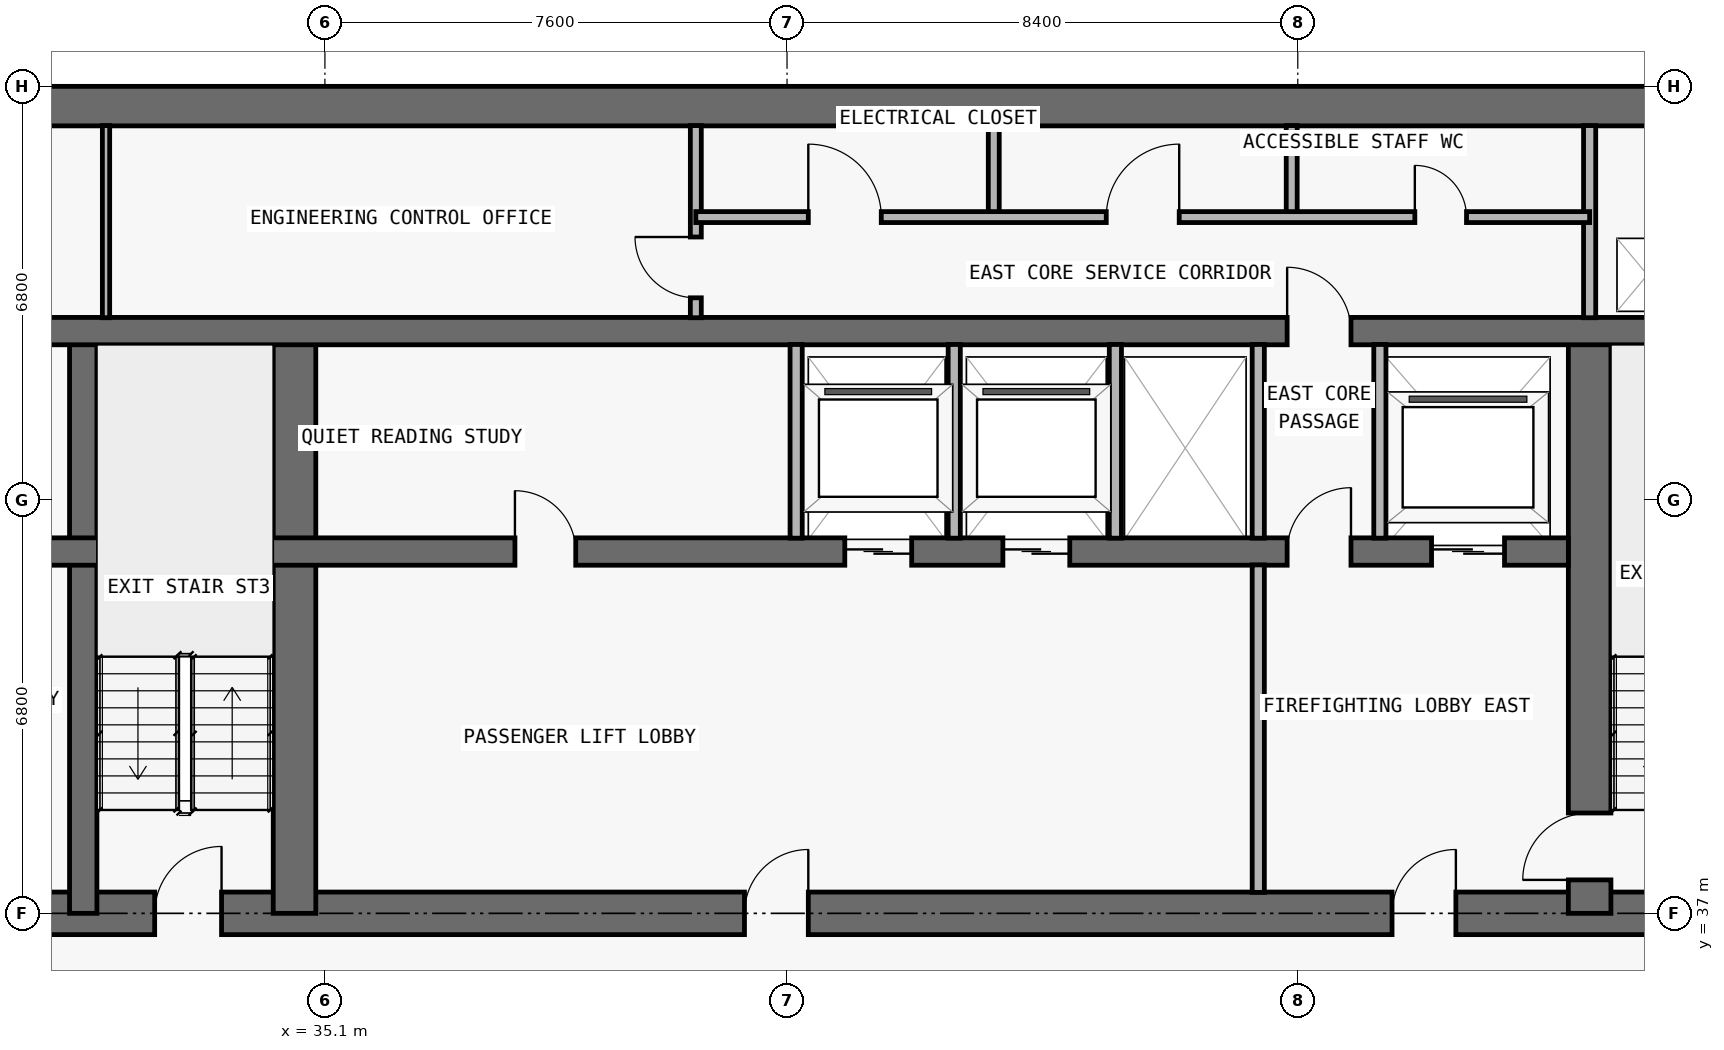
"""IFC4 building model, lengths in metres.
Left out: names, types, materials, properties, quantities, classifications, styles, units other than length and angle.
Written with IfcOpenShell. Run it as: python <this file> out.ifc"""

import sys

from ifc_helpers import new_model, si_unit, direction, frame, frame_2d, origin, place, context, subcontext, project, spatial, rectangle, extrude, element, fill, save


model = new_model("IFC4")
c1 = context("Model", 3, precision=1e-05, world=origin(), true_north=direction((0.0, 1.0)))
c2 = subcontext(c1, "Body", "Model", "MODEL_VIEW")
j1 = project(units=[si_unit("LENGTHUNIT", "METRE"), si_unit("PLANEANGLEUNIT", "RADIAN")], contexts=[c1])
p1 = place(None, origin())
s1 = spatial("IfcSite", under=j1, at=p1, CompositionType="ELEMENT")
p2 = place(p1, origin())
s2 = spatial("IfcBuilding", under=s1, at=p2, CompositionType="ELEMENT")
p3 = place(p2, frame((0.0, 0.0, 180.3)))
s3 = spatial("IfcBuildingStorey", under=s2, at=p3, CompositionType="ELEMENT", Elevation=180.3)
p4 = place(p3, frame((17.95, 37.0, 0.0), z_axis=(0.0, 0.0, 1.0), x_axis=(1.0, 0.0, 0.0)))
e1 = element("IfcWall", 1, at=p4, inside=s3, PredefinedType="SHEAR", context=c2, shape_type="SweptSolid", body=[
    extrude(rectangle(XDim=41.9, YDim=0.7, at=frame_2d((20.95, 0.0))), origin(), (0.0, 0.0, 1.0), 3.0),
])
p5 = place(p4, frame((14.35, 0.0, 0.0)))
e2 = element("IfcOpeningElement", 2, at=p5, cuts=e1, PredefinedType="OPENING", context=c2, shape_type="SweptSolid", body=[
    extrude(rectangle(XDim=1.1, YDim=2.15, at=frame_2d((0.55, 1.075))), frame((0.0, 0.36, 0.0), z_axis=(0.0, -1.0, 0.0), x_axis=(1.0, 0.0, 0.0)), (0.0, 0.0, 1.0), 0.72),
])
p6 = place(p4, frame((6.2, 0.0, 0.0)))
e3 = element("IfcOpeningElement", 3, at=p6, cuts=e1, PredefinedType="OPENING", context=c2, shape_type="SweptSolid", body=[
    extrude(rectangle(XDim=1.05, YDim=2.15, at=frame_2d((0.525, 1.075))), frame((0.0, 0.36, 0.0), z_axis=(0.0, -1.0, 0.0), x_axis=(1.0, 0.0, 0.0)), (0.0, 0.0, 1.0), 0.72),
])
p7 = place(p4, frame((34.7, 0.0, 0.0)))
e4 = element("IfcOpeningElement", 4, at=p7, cuts=e1, PredefinedType="OPENING", context=c2, shape_type="SweptSolid", body=[
    extrude(rectangle(XDim=1.05, YDim=2.15, at=frame_2d((0.525, 1.075))), frame((0.0, 0.36, 0.0), z_axis=(0.0, -1.0, 0.0), x_axis=(1.0, 0.0, 0.0)), (0.0, 0.0, 1.0), 0.72),
])
p8 = place(p4, frame((10.812, 0.0, 0.0)))
e5 = element("IfcOpeningElement", 5, at=p8, cuts=e1, PredefinedType="OPENING", context=c2, shape_type="SweptSolid", body=[
    extrude(rectangle(XDim=1.05, YDim=2.15, at=frame_2d((0.525, 1.075))), frame((0.0, 0.36, 0.0), z_axis=(0.0, -1.0, 0.0), x_axis=(1.0, 0.0, 0.0)), (0.0, 0.0, 1.0), 0.72),
])
p9 = place(p4, frame((24.05, 0.0, 0.0)))
e6 = element("IfcOpeningElement", 6, at=p9, cuts=e1, PredefinedType="OPENING", context=c2, shape_type="SweptSolid", body=[
    extrude(rectangle(XDim=1.05, YDim=2.15, at=frame_2d((0.525, 1.075))), frame((0.0, 0.36, 0.0), z_axis=(0.0, -1.0, 0.0), x_axis=(1.0, 0.0, 0.0)), (0.0, 0.0, 1.0), 0.72),
])
p10 = place(p3, frame((17.95, 50.275, 0.0), z_axis=(0.0, 0.0, 1.0), x_axis=(1.0, 0.0, 0.0)))
e7 = element("IfcWall", 7, at=p10, inside=s3, PredefinedType="SHEAR", context=c2, shape_type="SweptSolid", body=[
    extrude(rectangle(XDim=41.9, YDim=0.65, at=frame_2d((20.95, 0.0))), origin(), (0.0, 0.0, 1.0), 3.0),
])
p11 = place(p3, frame((55.9, 37.0, 0.0), z_axis=(0.0, 0.0, 1.0), x_axis=(0.0, 1.0, 0.0)))
e8 = element("IfcWall", 8, at=p11, inside=s3, PredefinedType="SHEAR", context=c2, shape_type="SweptSolid", body=[
    extrude(rectangle(XDim=9.575, YDim=0.7, at=frame_2d((4.788, 0.0))), origin(), (0.0, 0.0, 1.0), 3.0),
])
p12 = place(p11, frame((0.55, 0.0, 0.0)))
e9 = element("IfcOpeningElement", 9, at=p12, cuts=e8, PredefinedType="OPENING", context=c2, shape_type="SweptSolid", body=[
    extrude(rectangle(XDim=1.1, YDim=2.15, at=frame_2d((0.55, 1.075))), frame((0.0, 0.36, 0.0), z_axis=(0.0, -1.0, 0.0), x_axis=(1.0, 0.0, 0.0)), (0.0, 0.0, 1.0), 0.72),
])
p13 = place(p3, frame((31.125, 37.0, 0.0), z_axis=(0.0, 0.0, 1.0), x_axis=(0.0, 1.0, 0.0)))
e10 = element("IfcWall", 10, at=p13, inside=s3, PredefinedType="SHEAR", context=c2, shape_type="SweptSolid", body=[
    extrude(rectangle(XDim=9.575, YDim=0.45, at=frame_2d((4.788, 0.0))), origin(), (0.0, 0.0, 1.0), 3.0),
])
p14 = place(p3, frame((34.6, 37.0, 0.0), z_axis=(0.0, 0.0, 1.0), x_axis=(0.0, 1.0, 0.0)))
e11 = element("IfcWall", 11, at=p14, inside=s3, PredefinedType="SHEAR", context=c2, shape_type="SweptSolid", body=[
    extrude(rectangle(XDim=9.575, YDim=0.7, at=frame_2d((4.788, 0.0))), origin(), (0.0, 0.0, 1.0), 3.0),
])
p15 = place(p3, frame((22.25, 42.95, 0.0), z_axis=(0.0, 0.0, 1.0), x_axis=(1.0, 0.0, 0.0)))
e12 = element("IfcWall", 12, at=p15, inside=s3, PredefinedType="SHEAR", context=c2, shape_type="SweptSolid", body=[
    extrude(rectangle(XDim=33.3, YDim=0.45, at=frame_2d((16.65, 0.0))), origin(), (0.0, 0.0, 1.0), 3.0),
])
p16 = place(p15, frame((1.05, 0.0, 0.0)))
e13 = element("IfcOpeningElement", 13, at=p16, cuts=e12, PredefinedType="OPENING", context=c2, shape_type="SweptSolid", body=[
    extrude(rectangle(XDim=1.2, YDim=2.2, at=frame_2d((0.6, 1.1))), frame((0.0, 0.235, 0.0), z_axis=(0.0, -1.0, 0.0), x_axis=(1.0, 0.0, 0.0)), (0.0, 0.0, 1.0), 0.47),
])
p17 = place(p15, frame((31.05, 0.0, 0.0)))
e14 = element("IfcOpeningElement", 14, at=p17, cuts=e12, PredefinedType="OPENING", context=c2, shape_type="SweptSolid", body=[
    extrude(rectangle(XDim=1.2, YDim=2.2, at=frame_2d((0.6, 1.1))), frame((0.0, 0.235, 0.0), z_axis=(0.0, -1.0, 0.0), x_axis=(1.0, 0.0, 0.0)), (0.0, 0.0, 1.0), 0.47),
])
p18 = place(p15, frame((21.4, 0.0, 0.0)))
e15 = element("IfcOpeningElement", 15, at=p18, cuts=e12, PredefinedType="OPENING", context=c2, shape_type="SweptSolid", body=[
    extrude(rectangle(XDim=1.1, YDim=2.2, at=frame_2d((0.55, 1.1))), frame((0.0, 0.235, 0.0), z_axis=(0.0, -1.0, 0.0), x_axis=(1.0, 0.0, 0.0)), (0.0, 0.0, 1.0), 0.47),
])
p19 = place(p15, frame((24.0, 0.0, 0.0)))
e16 = element("IfcOpeningElement", 16, at=p19, cuts=e12, PredefinedType="OPENING", context=c2, shape_type="SweptSolid", body=[
    extrude(rectangle(XDim=1.1, YDim=2.2, at=frame_2d((0.55, 1.1))), frame((0.0, 0.235, 0.0), z_axis=(0.0, -1.0, 0.0), x_axis=(1.0, 0.0, 0.0)), (0.0, 0.0, 1.0), 0.47),
])
p20 = place(p15, frame((3.625, 0.0, 0.0)))
e17 = element("IfcOpeningElement", 17, at=p20, cuts=e12, PredefinedType="OPENING", context=c2, shape_type="SweptSolid", body=[
    extrude(rectangle(XDim=1.05, YDim=2.15, at=frame_2d((0.525, 1.075))), frame((0.0, 0.235, 0.0), z_axis=(0.0, -1.0, 0.0), x_axis=(1.0, 0.0, 0.0)), (0.0, 0.0, 1.0), 0.47),
])
p21 = place(p15, frame((28.675, 0.0, 0.0)))
e18 = element("IfcOpeningElement", 18, at=p21, cuts=e12, PredefinedType="OPENING", context=c2, shape_type="SweptSolid", body=[
    extrude(rectangle(XDim=1.05, YDim=2.15, at=frame_2d((0.525, 1.075))), frame((0.0, 0.235, 0.0), z_axis=(0.0, -1.0, 0.0), x_axis=(1.0, 0.0, 0.0)), (0.0, 0.0, 1.0), 0.47),
])
p22 = place(p15, frame((15.975, 0.0, 0.0)))
e19 = element("IfcOpeningElement", 19, at=p22, cuts=e12, PredefinedType="OPENING", context=c2, shape_type="SweptSolid", body=[
    extrude(rectangle(XDim=1.0, YDim=2.2, at=frame_2d((0.5, 1.1))), frame((0.0, 0.235, 0.0), z_axis=(0.0, -1.0, 0.0), x_axis=(1.0, 0.0, 0.0)), (0.0, 0.0, 1.0), 0.47),
])
p23 = place(p3, frame((18.3, 46.575, 0.0), z_axis=(0.0, 0.0, 1.0), x_axis=(1.0, 0.0, 0.0)))
e20 = element("IfcWall", 20, at=p23, inside=s3, PredefinedType="SHEAR", context=c2, shape_type="SweptSolid", body=[
    extrude(rectangle(XDim=41.2, YDim=0.45, at=frame_2d((20.6, 0.0))), origin(), (0.0, 0.0, 1.0), 3.0),
])
p24 = place(p23, frame((7.6, 0.0, 0.0)))
e21 = element("IfcOpeningElement", 21, at=p24, cuts=e20, PredefinedType="OPENING", context=c2, shape_type="SweptSolid", body=[
    extrude(rectangle(XDim=1.0, YDim=2.2, at=frame_2d((0.5, 1.1))), frame((0.0, 0.235, 0.0), z_axis=(0.0, -1.0, 0.0), x_axis=(1.0, 0.0, 0.0)), (0.0, 0.0, 1.0), 0.47),
])
p25 = place(p23, frame((32.625, 0.0, 0.0)))
e22 = element("IfcOpeningElement", 22, at=p25, cuts=e20, PredefinedType="OPENING", context=c2, shape_type="SweptSolid", body=[
    extrude(rectangle(XDim=1.05, YDim=2.15, at=frame_2d((0.525, 1.075))), frame((0.0, 0.235, 0.0), z_axis=(0.0, -1.0, 0.0), x_axis=(1.0, 0.0, 0.0)), (0.0, 0.0, 1.0), 0.47),
])
p26 = place(p3, frame((31.5, 46.795, 0.0), z_axis=(0.0, 0.0, 1.0), x_axis=(0.0, 1.0, 0.0)))
e23 = element("IfcWall", 23, at=p26, inside=s3, PredefinedType="PARTITIONING", context=c2, shape_type="SweptSolid", body=[
    extrude(rectangle(XDim=3.16, YDim=0.12, at=frame_2d((1.58, 0.0))), origin(), (0.0, 0.0, 1.0), 3.0),
])
p27 = place(p3, frame((41.2, 46.795, 0.0), z_axis=(0.0, 0.0, 1.0), x_axis=(0.0, 1.0, 0.0)))
e24 = element("IfcWall", 24, at=p27, inside=s3, PredefinedType="PARTITIONING", context=c2, shape_type="SweptSolid", body=[
    extrude(rectangle(XDim=3.16, YDim=0.18, at=frame_2d((1.58, 0.0))), origin(), (0.0, 0.0, 1.0), 3.0),
])
p28 = place(p27, frame((0.327, 0.0, 0.0)))
e25 = element("IfcOpeningElement", 25, at=p28, cuts=e24, PredefinedType="OPENING", context=c2, shape_type="SweptSolid", body=[
    extrude(rectangle(XDim=1.0, YDim=2.2, at=frame_2d((0.5, 1.1))), frame((0.0, 0.1, 0.0), z_axis=(0.0, -1.0, 0.0), x_axis=(1.0, 0.0, 0.0)), (0.0, 0.0, 1.0), 0.2),
])
for number, where, z_axis, x_axis in (
    (26, (42.85, 43.17, 0.0), (0.0, 0.0, 1.0), (0.0, 1.0, 0.0)),
    (27, (45.45, 43.17, 0.0), (0.0, 0.0, 1.0), (0.0, 1.0, 0.0)),
):
    element("IfcWall", number, at=place(p3, frame(where, z_axis=z_axis, x_axis=x_axis)), inside=s3, PredefinedType="PARTITIONING", context=c2, shape_type="SweptSolid", body=[
        extrude(rectangle(XDim=3.185, YDim=0.2, at=frame_2d((1.593, 0.0))), origin(), (0.0, 0.0, 1.0), 3.0),
    ])
p29 = place(p3, frame((46.1, 48.45, 0.0), z_axis=(0.0, 0.0, 1.0), x_axis=(0.0, 1.0, 0.0)))
e28 = element("IfcWall", 28, at=p29, inside=s3, PredefinedType="PARTITIONING", context=c2, shape_type="SweptSolid", body=[
    extrude(rectangle(XDim=1.505, YDim=0.18, at=frame_2d((0.752, 0.0))), origin(), (0.0, 0.0, 1.0), 3.0),
])
p30 = place(p3, frame((48.1, 43.17, 0.0), z_axis=(0.0, 0.0, 1.0), x_axis=(0.0, 1.0, 0.0)))
e29 = element("IfcWall", 29, at=p30, inside=s3, PredefinedType="PARTITIONING", context=c2, shape_type="SweptSolid", body=[
    extrude(rectangle(XDim=3.185, YDim=0.2, at=frame_2d((1.593, 0.0))), origin(), (0.0, 0.0, 1.0), 3.0),
])
p31 = place(p3, frame((50.45, 37.345, 0.0), z_axis=(0.0, 0.0, 1.0), x_axis=(0.0, 1.0, 0.0)))
e30 = element("IfcWall", 30, at=p31, inside=s3, PredefinedType="PARTITIONING", context=c2, shape_type="SweptSolid", body=[
    extrude(rectangle(XDim=5.385, YDim=0.2, at=frame_2d((2.692, 0.0))), origin(), (0.0, 0.0, 1.0), 3.0),
])
p32 = place(p3, frame((50.45, 43.17, 0.0), z_axis=(0.0, 0.0, 1.0), x_axis=(0.0, 1.0, 0.0)))
e31 = element("IfcWall", 31, at=p32, inside=s3, PredefinedType="PARTITIONING", context=c2, shape_type="SweptSolid", body=[
    extrude(rectangle(XDim=3.185, YDim=0.2, at=frame_2d((1.593, 0.0))), origin(), (0.0, 0.0, 1.0), 3.0),
])
p33 = place(p3, frame((51.0, 48.45, 0.0), z_axis=(0.0, 0.0, 1.0), x_axis=(0.0, 1.0, 0.0)))
e32 = element("IfcWall", 32, at=p33, inside=s3, PredefinedType="PARTITIONING", context=c2, shape_type="SweptSolid", body=[
    extrude(rectangle(XDim=1.505, YDim=0.18, at=frame_2d((0.752, 0.0))), origin(), (0.0, 0.0, 1.0), 3.0),
])
p34 = place(p3, frame((52.45, 43.17, 0.0), z_axis=(0.0, 0.0, 1.0), x_axis=(0.0, 1.0, 0.0)))
e33 = element("IfcWall", 33, at=p34, inside=s3, PredefinedType="PARTITIONING", context=c2, shape_type="SweptSolid", body=[
    extrude(rectangle(XDim=3.185, YDim=0.2, at=frame_2d((1.593, 0.0))), origin(), (0.0, 0.0, 1.0), 3.0),
])
p35 = place(p3, frame((55.9, 46.795, 0.0), z_axis=(0.0, 0.0, 1.0), x_axis=(0.0, 1.0, 0.0)))
e34 = element("IfcWall", 34, at=p35, inside=s3, PredefinedType="PARTITIONING", context=c2, shape_type="SweptSolid", body=[
    extrude(rectangle(XDim=3.16, YDim=0.2, at=frame_2d((1.58, 0.0))), origin(), (0.0, 0.0, 1.0), 3.0),
])
p36 = place(p3, frame((41.2, 48.45, 0.0), z_axis=(0.0, 0.0, 1.0), x_axis=(1.0, 0.0, 0.0)))
e35 = element("IfcWall", 35, at=p36, inside=s3, PredefinedType="PARTITIONING", context=c2, shape_type="SweptSolid", body=[
    extrude(rectangle(XDim=14.7, YDim=0.18, at=frame_2d((7.35, 0.0))), origin(), (0.0, 0.0, 1.0), 3.0),
])
p37 = place(p36, frame((1.85, 0.0, 0.0)))
e36 = element("IfcOpeningElement", 36, at=p37, cuts=e35, PredefinedType="OPENING", context=c2, shape_type="SweptSolid", body=[
    extrude(rectangle(XDim=1.2, YDim=2.2, at=frame_2d((0.6, 1.1))), frame((0.0, 0.1, 0.0), z_axis=(0.0, -1.0, 0.0), x_axis=(1.0, 0.0, 0.0)), (0.0, 0.0, 1.0), 0.2),
])
p38 = place(p36, frame((6.75, 0.0, 0.0)))
e37 = element("IfcOpeningElement", 37, at=p38, cuts=e35, PredefinedType="OPENING", context=c2, shape_type="SweptSolid", body=[
    extrude(rectangle(XDim=1.2, YDim=2.2, at=frame_2d((0.6, 1.1))), frame((0.0, 0.1, 0.0), z_axis=(0.0, -1.0, 0.0), x_axis=(1.0, 0.0, 0.0)), (0.0, 0.0, 1.0), 0.2),
])
p39 = place(p36, frame((11.825, 0.0, 0.0)))
e38 = element("IfcOpeningElement", 38, at=p39, cuts=e35, PredefinedType="OPENING", context=c2, shape_type="SweptSolid", body=[
    extrude(rectangle(XDim=0.85, YDim=2.1, at=frame_2d((0.425, 1.05))), frame((0.0, 0.1, 0.0), z_axis=(0.0, -1.0, 0.0), x_axis=(1.0, 0.0, 0.0)), (0.0, 0.0, 1.0), 0.2),
])
p40 = place(p17, origin())
e39 = element("IfcDoor", 39, at=p40, inside=s3, OperationType="DOUBLE_DOOR_SLIDING", PredefinedType="DOOR", context=c2, shape_type="SweptSolid", body=[
    extrude(rectangle(XDim=1.2, YDim=2.2, at=frame_2d((0.6, 1.1))), frame((0.0, 0.025, 0.0), z_axis=(0.0, -1.0, 0.0), x_axis=(1.0, 0.0, 0.0)), (0.0, 0.0, 1.0), 0.05),
])
fill(e14, e39)
p41 = place(p18, origin())
e40 = element("IfcDoor", 40, at=p41, inside=s3, OperationType="DOUBLE_DOOR_SLIDING", PredefinedType="DOOR", context=c2, shape_type="SweptSolid", body=[
    extrude(rectangle(XDim=1.1, YDim=2.2, at=frame_2d((0.55, 1.1))), frame((0.0, 0.025, 0.0), z_axis=(0.0, -1.0, 0.0), x_axis=(1.0, 0.0, 0.0)), (0.0, 0.0, 1.0), 0.05),
])
fill(e15, e40)
p42 = place(p19, origin())
e41 = element("IfcDoor", 41, at=p42, inside=s3, OperationType="DOUBLE_DOOR_SLIDING", PredefinedType="DOOR", context=c2, shape_type="SweptSolid", body=[
    extrude(rectangle(XDim=1.1, YDim=2.2, at=frame_2d((0.55, 1.1))), frame((0.0, 0.025, 0.0), z_axis=(0.0, -1.0, 0.0), x_axis=(1.0, 0.0, 0.0)), (0.0, 0.0, 1.0), 0.05),
])
fill(e16, e41)
p43 = place(p5, origin())
e42 = element("IfcDoor", 42, at=p43, inside=s3, OperationType="SINGLE_SWING_RIGHT", PredefinedType="DOOR", context=c2, shape_type="SweptSolid", body=[
    extrude(rectangle(XDim=1.1, YDim=2.15, at=frame_2d((0.55, 1.075))), frame((0.0, 0.025, 0.0), z_axis=(0.0, -1.0, 0.0), x_axis=(1.0, 0.0, 0.0)), (0.0, 0.0, 1.0), 0.05),
])
fill(e2, e42)
p44 = place(p7, origin())
e43 = element("IfcDoor", 43, at=p44, inside=s3, OperationType="SINGLE_SWING_RIGHT", PredefinedType="DOOR", context=c2, shape_type="SweptSolid", body=[
    extrude(rectangle(XDim=1.05, YDim=2.15, at=frame_2d((0.525, 1.075))), frame((0.0, 0.025, 0.0), z_axis=(0.0, -1.0, 0.0), x_axis=(1.0, 0.0, 0.0)), (0.0, 0.0, 1.0), 0.05),
])
fill(e4, e43)
p45 = place(p12, origin())
e44 = element("IfcDoor", 44, at=p45, inside=s3, OperationType="SINGLE_SWING_LEFT", PredefinedType="DOOR", context=c2, shape_type="SweptSolid", body=[
    extrude(rectangle(XDim=1.1, YDim=2.15, at=frame_2d((0.55, 1.075))), frame((0.0, 0.025, 0.0), z_axis=(0.0, -1.0, 0.0), x_axis=(1.0, 0.0, 0.0)), (0.0, 0.0, 1.0), 0.05),
])
fill(e9, e44)
p46 = place(p21, origin())
e45 = element("IfcDoor", 45, at=p46, inside=s3, OperationType="SINGLE_SWING_RIGHT", PredefinedType="DOOR", context=c2, shape_type="SweptSolid", body=[
    extrude(rectangle(XDim=1.05, YDim=2.15, at=frame_2d((0.525, 1.075))), frame((0.0, 0.025, 0.0), z_axis=(0.0, -1.0, 0.0), x_axis=(1.0, 0.0, 0.0)), (0.0, 0.0, 1.0), 0.05),
])
fill(e18, e45)
p47 = place(p9, origin())
e46 = element("IfcDoor", 46, at=p47, inside=s3, OperationType="SINGLE_SWING_RIGHT", PredefinedType="DOOR", context=c2, shape_type="SweptSolid", body=[
    extrude(rectangle(XDim=1.05, YDim=2.15, at=frame_2d((0.525, 1.075))), frame((0.0, 0.025, 0.0), z_axis=(0.0, -1.0, 0.0), x_axis=(1.0, 0.0, 0.0)), (0.0, 0.0, 1.0), 0.05),
])
fill(e6, e46)
p48 = place(p22, origin())
e47 = element("IfcDoor", 47, at=p48, inside=s3, OperationType="SINGLE_SWING_LEFT", PredefinedType="DOOR", context=c2, shape_type="SweptSolid", body=[
    extrude(rectangle(XDim=1.0, YDim=2.2, at=frame_2d((0.5, 1.1))), frame((0.0, 0.025, 0.0), z_axis=(0.0, -1.0, 0.0), x_axis=(1.0, 0.0, 0.0)), (0.0, 0.0, 1.0), 0.05),
])
fill(e19, e47)
p49 = place(p25, origin())
e48 = element("IfcDoor", 48, at=p49, inside=s3, OperationType="SINGLE_SWING_LEFT", PredefinedType="DOOR", context=c2, shape_type="SweptSolid", body=[
    extrude(rectangle(XDim=1.05, YDim=2.15, at=frame_2d((0.525, 1.075))), frame((0.0, 0.025, 0.0), z_axis=(0.0, -1.0, 0.0), x_axis=(1.0, 0.0, 0.0)), (0.0, 0.0, 1.0), 0.05),
])
fill(e22, e48)
p50 = place(p28, origin())
e49 = element("IfcDoor", 49, at=p50, inside=s3, OperationType="SINGLE_SWING_RIGHT", PredefinedType="DOOR", context=c2, shape_type="SweptSolid", body=[
    extrude(rectangle(XDim=1.0, YDim=2.2, at=frame_2d((0.5, 1.1))), frame((0.0, 0.025, 0.0), z_axis=(0.0, -1.0, 0.0), x_axis=(1.0, 0.0, 0.0)), (0.0, 0.0, 1.0), 0.05),
])
fill(e25, e49)
p51 = place(p37, origin())
e50 = element("IfcDoor", 50, at=p51, inside=s3, OperationType="SINGLE_SWING_LEFT", PredefinedType="DOOR", context=c2, shape_type="SweptSolid", body=[
    extrude(rectangle(XDim=1.2, YDim=2.2, at=frame_2d((0.6, 1.1))), frame((0.0, 0.025, 0.0), z_axis=(0.0, -1.0, 0.0), x_axis=(1.0, 0.0, 0.0)), (0.0, 0.0, 1.0), 0.05),
])
fill(e36, e50)
p52 = place(p38, origin())
e51 = element("IfcDoor", 51, at=p52, inside=s3, OperationType="SINGLE_SWING_RIGHT", PredefinedType="DOOR", context=c2, shape_type="SweptSolid", body=[
    extrude(rectangle(XDim=1.2, YDim=2.2, at=frame_2d((0.6, 1.1))), frame((0.0, 0.025, 0.0), z_axis=(0.0, -1.0, 0.0), x_axis=(1.0, 0.0, 0.0)), (0.0, 0.0, 1.0), 0.05),
])
fill(e37, e51)
p53 = place(p39, origin())
e52 = element("IfcDoor", 52, at=p53, inside=s3, OperationType="SINGLE_SWING_LEFT", PredefinedType="DOOR", context=c2, shape_type="SweptSolid", body=[
    extrude(rectangle(XDim=0.85, YDim=2.1, at=frame_2d((0.425, 1.05))), frame((0.0, 0.025, 0.0), z_axis=(0.0, -1.0, 0.0), x_axis=(1.0, 0.0, 0.0)), (0.0, 0.0, 1.0), 0.05),
])
fill(e38, e52)
save(model, sys.argv[1])
